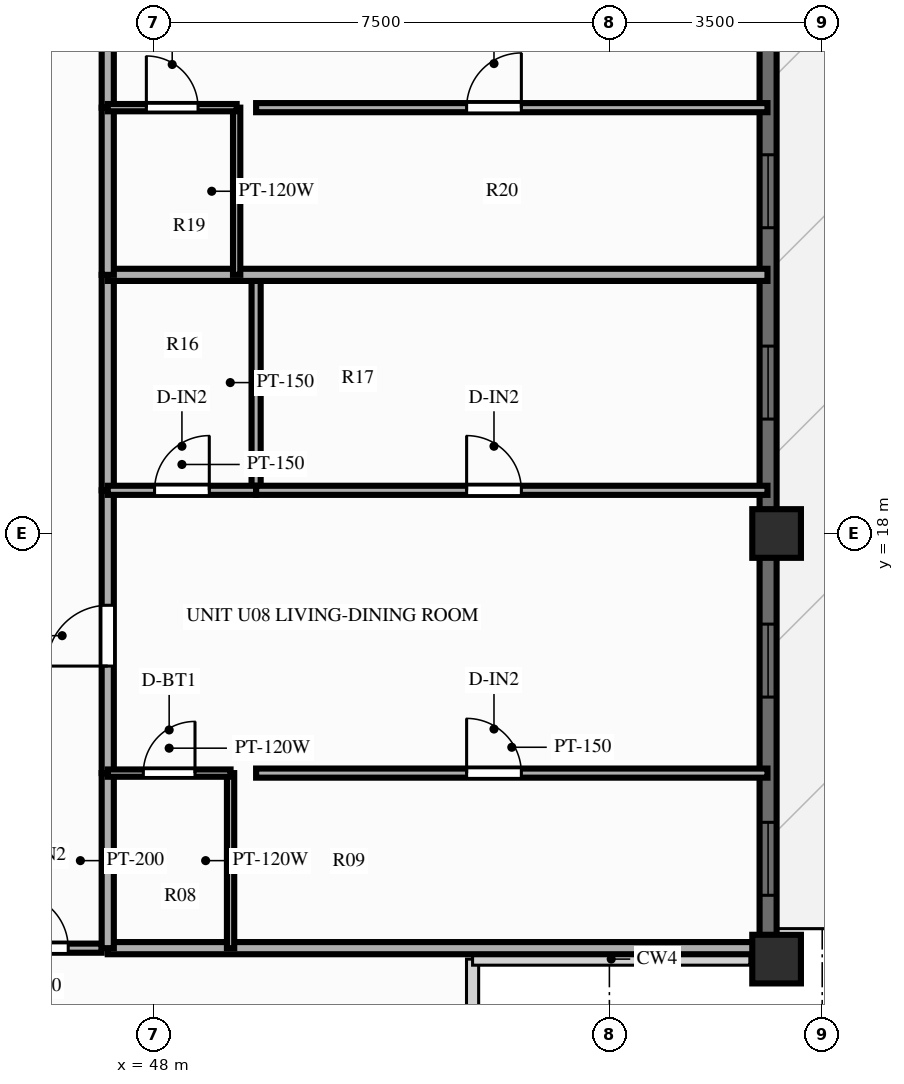
"""IFC4 building model, lengths in metres.
Left out: names, types, materials, properties, quantities, classifications, styles, units other than length and angle.
Written with IfcOpenShell. Run it as: python <this file> out.ifc"""

import sys

from ifc_helpers import new_model, si_unit, direction, frame, frame_2d, origin, origin_2d, place, context, subcontext, project, spatial, rectangle, extrude, source, transform, mapped, element, fill, save


model = new_model("IFC4")
c1 = context("Model", 3, precision=1e-05, world=origin(), true_north=direction((0.0, 1.0)))
c2 = subcontext(c1, "Body", "Model", "MODEL_VIEW")
j1 = project(units=[si_unit("LENGTHUNIT", "METRE"), si_unit("PLANEANGLEUNIT", "RADIAN")], contexts=[c1])
p1 = place(None, origin())
s1 = spatial("IfcSite", under=j1, at=p1, CompositionType="ELEMENT")
p2 = place(p1, origin())
s2 = spatial("IfcBuilding", under=s1, at=p2, CompositionType="ELEMENT")
p3 = place(p2, frame((0.0, 0.0, 176.8)))
s3 = spatial("IfcBuildingStorey", under=s2, at=p3, CompositionType="ELEMENT", Elevation=176.8)
m1 = source(origin(), c2, "Body", "SweptSolid", [
    extrude(rectangle(XDim=0.8, YDim=0.8, at=origin_2d()), origin(), (0.0, 0.0, 1.0), 3.0),
])
for number, where, z_axis, x_axis in (
    (1, (58.25, 11.0, 0.0), (0.0, 0.0, 1.0), (1.0, 0.0, 0.0)),
    (2, (58.25, 18.0, 0.0), (0.0, 0.0, 1.0), (1.0, 0.0, 0.0)),
):
    element("IfcColumn", number, at=place(p3, frame(where, z_axis=z_axis, x_axis=x_axis)), inside=s3, PredefinedType="COLUMN", context=c2, shape_type="MappedRepresentation", body=[
        mapped(m1, transform((0.0, 0.0, 0.0), scale=1.0)),
    ])
p4 = place(p3, frame((58.11, 11.0, 0.0), z_axis=(0.0, 0.0, 1.0), x_axis=(0.0, 1.0, 0.0)))
e3 = element("IfcWall", 3, at=p4, inside=s3, PredefinedType="SOLIDWALL", context=c2, shape_type="SweptSolid", body=[
    extrude(rectangle(XDim=32.0, YDim=0.28, at=frame_2d((16.0, 0.0))), origin(), (0.0, 0.0, 1.0), 2.28),
])
p5 = place(p4, frame((1.05, 0.0, 0.25)))
e4 = element("IfcOpeningElement", 4, at=p5, cuts=e3, PredefinedType="OPENING", context=c2, shape_type="SweptSolid", body=[
    extrude(rectangle(XDim=1.2, YDim=1.5, at=frame_2d((0.6, 0.75))), frame((0.0, 0.152, 0.0), z_axis=(0.0, -1.0, 0.0), x_axis=(1.0, 0.0, 0.0)), (0.0, 0.0, 1.0), 0.304),
])
p6 = place(p4, frame((4.31, 0.0, 0.25)))
e5 = element("IfcOpeningElement", 5, at=p6, cuts=e3, PredefinedType="OPENING", context=c2, shape_type="SweptSolid", body=[
    extrude(rectangle(XDim=1.2, YDim=1.5, at=frame_2d((0.6, 0.75))), frame((0.0, 0.152, 0.0), z_axis=(0.0, -1.0, 0.0), x_axis=(1.0, 0.0, 0.0)), (0.0, 0.0, 1.0), 0.304),
])
p7 = place(p4, frame((8.882, 0.0, 0.25)))
e6 = element("IfcOpeningElement", 6, at=p7, cuts=e3, PredefinedType="OPENING", context=c2, shape_type="SweptSolid", body=[
    extrude(rectangle(XDim=1.2, YDim=1.5, at=frame_2d((0.6, 0.75))), frame((0.0, 0.152, 0.0), z_axis=(0.0, -1.0, 0.0), x_axis=(1.0, 0.0, 0.0)), (0.0, 0.0, 1.0), 0.304),
])
p8 = place(p4, frame((12.029, 0.0, 0.25)))
e7 = element("IfcOpeningElement", 7, at=p8, cuts=e3, PredefinedType="OPENING", context=c2, shape_type="SweptSolid", body=[
    extrude(rectangle(XDim=1.2, YDim=1.5, at=frame_2d((0.6, 0.75))), frame((0.0, 0.152, 0.0), z_axis=(0.0, -1.0, 0.0), x_axis=(1.0, 0.0, 0.0)), (0.0, 0.0, 1.0), 0.304),
])
p9 = place(p4, frame((16.718, 0.0, 0.0), z_axis=(0.0, 0.0, 1.0), x_axis=(-1.0, 0.0, 0.0)))
e8 = element("IfcOpeningElement", 8, at=p9, cuts=e3, PredefinedType="OPENING", context=c2, shape_type="SweptSolid", body=[
    extrude(rectangle(XDim=1.6, YDim=2.15, at=frame_2d((0.8, 1.075))), frame((0.0, 0.152, 0.0), z_axis=(0.0, -1.0, 0.0), x_axis=(1.0, 0.0, 0.0)), (0.0, 0.0, 1.0), 0.304),
])
p10 = place(p4, frame((19.163, 0.0, 0.25)))
e9 = element("IfcOpeningElement", 9, at=p10, cuts=e3, PredefinedType="OPENING", context=c2, shape_type="SweptSolid", body=[
    extrude(rectangle(XDim=1.2, YDim=1.5, at=frame_2d((0.6, 0.75))), frame((0.0, 0.152, 0.0), z_axis=(0.0, -1.0, 0.0), x_axis=(1.0, 0.0, 0.0)), (0.0, 0.0, 1.0), 0.304),
])
p11 = place(p4, frame((22.47, 0.0, 0.25)))
e10 = element("IfcOpeningElement", 10, at=p11, cuts=e3, PredefinedType="OPENING", context=c2, shape_type="SweptSolid", body=[
    extrude(rectangle(XDim=1.2, YDim=1.5, at=frame_2d((0.6, 0.75))), frame((0.0, 0.152, 0.0), z_axis=(0.0, -1.0, 0.0), x_axis=(1.0, 0.0, 0.0)), (0.0, 0.0, 1.0), 0.304),
])
p12 = place(p4, frame((26.006, 0.0, 0.25)))
e11 = element("IfcOpeningElement", 11, at=p12, cuts=e3, PredefinedType="OPENING", context=c2, shape_type="SweptSolid", body=[
    extrude(rectangle(XDim=1.2, YDim=1.5, at=frame_2d((0.6, 0.75))), frame((0.0, 0.152, 0.0), z_axis=(0.0, -1.0, 0.0), x_axis=(1.0, 0.0, 0.0)), (0.0, 0.0, 1.0), 0.304),
])
p13 = place(p4, frame((29.266, 0.0, 0.25)))
e12 = element("IfcOpeningElement", 12, at=p13, cuts=e3, PredefinedType="OPENING", context=c2, shape_type="SweptSolid", body=[
    extrude(rectangle(XDim=1.2, YDim=1.5, at=frame_2d((0.6, 0.75))), frame((0.0, 0.152, 0.0), z_axis=(0.0, -1.0, 0.0), x_axis=(1.0, 0.0, 0.0)), (0.0, 0.0, 1.0), 0.304),
])
p14 = place(p3, frame((44.82, 11.18, 0.0), z_axis=(0.0, 0.0, 1.0), x_axis=(1.0, 0.0, 0.0)))
e13 = element("IfcWall", 13, at=p14, inside=s3, PredefinedType="PARTITIONING", context=c2, shape_type="SweptSolid", body=[
    extrude(rectangle(XDim=2.33, YDim=0.15, at=frame_2d((1.165, 0.0))), origin(), (0.0, 0.0, 1.0), 2.79),
])
p15 = place(p14, frame((0.88, 0.0, 0.0)))
e14 = element("IfcOpeningElement", 14, at=p15, cuts=e13, PredefinedType="OPENING", context=c2, shape_type="SweptSolid", body=[
    extrude(rectangle(XDim=0.9, YDim=2.1, at=frame_2d((0.45, 1.05))), frame((0.0, 0.087, 0.0), z_axis=(0.0, -1.0, 0.0), x_axis=(1.0, 0.0, 0.0)), (0.0, 0.0, 1.0), 0.174),
])
p16 = place(p3, frame((47.25, 11.18, 0.0), z_axis=(0.0, 0.0, 1.0), x_axis=(1.0, 0.0, 0.0)))
e15 = element("IfcWall", 15, at=p16, inside=s3, PredefinedType="PARTITIONING", context=c2, shape_type="SweptSolid", body=[
    extrude(rectangle(XDim=10.85, YDim=0.2, at=frame_2d((5.425, 0.0))), origin(), (0.0, 0.0, 1.0), 2.79),
])
p17 = place(p3, frame((47.25, 11.18, 0.0), z_axis=(0.0, 0.0, 1.0), x_axis=(0.0, 1.0, 0.0)))
e16 = element("IfcWall", 16, at=p17, inside=s3, PredefinedType="PARTITIONING", context=c2, shape_type="SweptSolid", body=[
    extrude(rectangle(XDim=2.879, YDim=0.2, at=frame_2d((1.439, 0.0))), origin(), (0.0, 0.0, 1.0), 2.79),
])
p18 = place(p3, frame((47.25, 14.059, 0.0), z_axis=(0.0, 0.0, 1.0), x_axis=(0.0, 1.0, 0.0)))
e17 = element("IfcWall", 17, at=p18, inside=s3, PredefinedType="PARTITIONING", context=c2, shape_type="SweptSolid", body=[
    extrude(rectangle(XDim=4.651, YDim=0.2, at=frame_2d((2.326, 0.0))), origin(), (0.0, 0.0, 1.0), 2.79),
])
p19 = place(p18, frame((1.76, 0.0, 0.0)))
e18 = element("IfcOpeningElement", 18, at=p19, cuts=e17, PredefinedType="OPENING", context=c2, shape_type="SweptSolid", body=[
    extrude(rectangle(XDim=1.0, YDim=2.15, at=frame_2d((0.5, 1.075))), frame((0.0, 0.112, 0.0), z_axis=(0.0, -1.0, 0.0), x_axis=(1.0, 0.0, 0.0)), (0.0, 0.0, 1.0), 0.224),
])
p20 = place(p3, frame((47.25, 18.71, 0.0), z_axis=(0.0, 0.0, 1.0), x_axis=(0.0, 1.0, 0.0)))
e19 = element("IfcWall", 19, at=p20, inside=s3, PredefinedType="PARTITIONING", context=c2, shape_type="SweptSolid", body=[
    extrude(rectangle(XDim=3.544, YDim=0.2, at=frame_2d((1.772, 0.0))), origin(), (0.0, 0.0, 1.0), 2.79),
])
p21 = place(p3, frame((49.27, 11.18, 0.0), z_axis=(0.0, 0.0, 1.0), x_axis=(0.0, 1.0, 0.0)))
e20 = element("IfcWall", 20, at=p21, inside=s3, PredefinedType="PARTITIONING", context=c2, shape_type="SweptSolid", body=[
    extrude(rectangle(XDim=2.879, YDim=0.12, at=frame_2d((1.439, 0.0))), origin(), (0.0, 0.0, 1.0), 2.79),
])
p22 = place(p3, frame((49.69, 18.71, 0.0), z_axis=(0.0, 0.0, 1.0), x_axis=(0.0, 1.0, 0.0)))
e21 = element("IfcWall", 21, at=p22, inside=s3, PredefinedType="PARTITIONING", context=c2, shape_type="SweptSolid", body=[
    extrude(rectangle(XDim=3.544, YDim=0.15, at=frame_2d((1.772, 0.0))), origin(), (0.0, 0.0, 1.0), 2.79),
])
p23 = place(p3, frame((47.25, 14.059, 0.0), z_axis=(0.0, 0.0, 1.0), x_axis=(1.0, 0.0, 0.0)))
e22 = element("IfcWall", 22, at=p23, inside=s3, PredefinedType="PARTITIONING", context=c2, shape_type="SweptSolid", body=[
    extrude(rectangle(XDim=2.02, YDim=0.12, at=frame_2d((1.01, 0.0))), origin(), (0.0, 0.0, 1.0), 2.79),
])
p24 = place(p23, frame((0.585, 0.0, 0.0)))
e23 = element("IfcOpeningElement", 23, at=p24, cuts=e22, PredefinedType="OPENING", context=c2, shape_type="SweptSolid", body=[
    extrude(rectangle(XDim=0.85, YDim=2.05, at=frame_2d((0.425, 1.025))), frame((0.0, 0.072, 0.0), z_axis=(0.0, -1.0, 0.0), x_axis=(1.0, 0.0, 0.0)), (0.0, 0.0, 1.0), 0.144),
])
p25 = place(p3, frame((49.69, 14.059, 0.0), z_axis=(0.0, 0.0, 1.0), x_axis=(1.0, 0.0, 0.0)))
e24 = element("IfcWall", 24, at=p25, inside=s3, PredefinedType="PARTITIONING", context=c2, shape_type="SweptSolid", body=[
    extrude(rectangle(XDim=8.41, YDim=0.15, at=frame_2d((4.205, 0.0))), origin(), (0.0, 0.0, 1.0), 2.79),
])
p26 = place(p25, frame((3.462, 0.0, 0.0)))
e25 = element("IfcOpeningElement", 25, at=p26, cuts=e24, PredefinedType="OPENING", context=c2, shape_type="SweptSolid", body=[
    extrude(rectangle(XDim=0.9, YDim=2.1, at=frame_2d((0.45, 1.05))), frame((0.0, 0.087, 0.0), z_axis=(0.0, -1.0, 0.0), x_axis=(1.0, 0.0, 0.0)), (0.0, 0.0, 1.0), 0.174),
])
p27 = place(p3, frame((47.25, 18.71, 0.0), z_axis=(0.0, 0.0, 1.0), x_axis=(1.0, 0.0, 0.0)))
e26 = element("IfcWall", 26, at=p27, inside=s3, PredefinedType="PARTITIONING", context=c2, shape_type="SweptSolid", body=[
    extrude(rectangle(XDim=2.44, YDim=0.15, at=frame_2d((1.22, 0.0))), origin(), (0.0, 0.0, 1.0), 2.79),
])
p28 = place(p27, frame((0.77, 0.0, 0.0)))
e27 = element("IfcOpeningElement", 27, at=p28, cuts=e26, PredefinedType="OPENING", context=c2, shape_type="SweptSolid", body=[
    extrude(rectangle(XDim=0.9, YDim=2.1, at=frame_2d((0.45, 1.05))), frame((0.0, 0.087, 0.0), z_axis=(0.0, -1.0, 0.0), x_axis=(1.0, 0.0, 0.0)), (0.0, 0.0, 1.0), 0.174),
])
p29 = place(p3, frame((49.69, 18.71, 0.0), z_axis=(0.0, 0.0, 1.0), x_axis=(1.0, 0.0, 0.0)))
e28 = element("IfcWall", 28, at=p29, inside=s3, PredefinedType="PARTITIONING", context=c2, shape_type="SweptSolid", body=[
    extrude(rectangle(XDim=8.41, YDim=0.15, at=frame_2d((4.205, 0.0))), origin(), (0.0, 0.0, 1.0), 2.79),
])
p30 = place(p29, frame((3.462, 0.0, 0.0)))
e29 = element("IfcOpeningElement", 29, at=p30, cuts=e28, PredefinedType="OPENING", context=c2, shape_type="SweptSolid", body=[
    extrude(rectangle(XDim=0.9, YDim=2.1, at=frame_2d((0.45, 1.05))), frame((0.0, 0.087, 0.0), z_axis=(0.0, -1.0, 0.0), x_axis=(1.0, 0.0, 0.0)), (0.0, 0.0, 1.0), 0.174),
])
p31 = place(p3, frame((47.25, 22.254, 0.0), z_axis=(0.0, 0.0, 1.0), x_axis=(1.0, 0.0, 0.0)))
e30 = element("IfcWall", 30, at=p31, inside=s3, PredefinedType="PARTITIONING", context=c2, shape_type="SweptSolid", body=[
    extrude(rectangle(XDim=10.85, YDim=0.2, at=frame_2d((5.425, 0.0))), origin(), (0.0, 0.0, 1.0), 2.39),
])
p32 = place(p3, frame((47.25, 22.254, 0.0), z_axis=(0.0, 0.0, 1.0), x_axis=(0.0, 1.0, 0.0)))
e31 = element("IfcWall", 31, at=p32, inside=s3, PredefinedType="PARTITIONING", context=c2, shape_type="SweptSolid", body=[
    extrude(rectangle(XDim=2.75, YDim=0.2, at=frame_2d((1.375, 0.0))), origin(), (0.0, 0.0, 1.0), 2.79),
])
p33 = place(p3, frame((47.25, 25.004, 0.0), z_axis=(0.0, 0.0, 1.0), x_axis=(0.0, 1.0, 0.0)))
e32 = element("IfcWall", 32, at=p33, inside=s3, PredefinedType="PARTITIONING", context=c2, shape_type="SweptSolid", body=[
    extrude(rectangle(XDim=3.827, YDim=0.2, at=frame_2d((1.914, 0.0))), origin(), (0.0, 0.0, 1.0), 2.79),
])
p34 = place(p33, frame((1.413, 0.0, 0.0)))
e33 = element("IfcOpeningElement", 33, at=p34, cuts=e32, PredefinedType="OPENING", context=c2, shape_type="SweptSolid", body=[
    extrude(rectangle(XDim=1.0, YDim=2.15, at=frame_2d((0.5, 1.075))), frame((0.0, 0.112, 0.0), z_axis=(0.0, -1.0, 0.0), x_axis=(1.0, 0.0, 0.0)), (0.0, 0.0, 1.0), 0.224),
])
p35 = place(p3, frame((49.37, 22.254, 0.0), z_axis=(0.0, 0.0, 1.0), x_axis=(0.0, 1.0, 0.0)))
e34 = element("IfcWall", 34, at=p35, inside=s3, PredefinedType="PARTITIONING", context=c2, shape_type="SweptSolid", body=[
    extrude(rectangle(XDim=2.75, YDim=0.12, at=frame_2d((1.375, 0.0))), origin(), (0.0, 0.0, 1.0), 2.79),
])
p36 = place(p3, frame((47.25, 25.004, 0.0), z_axis=(0.0, 0.0, 1.0), x_axis=(1.0, 0.0, 0.0)))
e35 = element("IfcWall", 35, at=p36, inside=s3, PredefinedType="PARTITIONING", context=c2, shape_type="SweptSolid", body=[
    extrude(rectangle(XDim=2.12, YDim=0.12, at=frame_2d((1.06, 0.0))), origin(), (0.0, 0.0, 1.0), 2.79),
])
p37 = place(p36, frame((0.635, 0.0, 0.0)))
e36 = element("IfcOpeningElement", 36, at=p37, cuts=e35, PredefinedType="OPENING", context=c2, shape_type="SweptSolid", body=[
    extrude(rectangle(XDim=0.85, YDim=2.05, at=frame_2d((0.425, 1.025))), frame((0.0, 0.072, 0.0), z_axis=(0.0, -1.0, 0.0), x_axis=(1.0, 0.0, 0.0)), (0.0, 0.0, 1.0), 0.144),
])
p38 = place(p3, frame((49.69, 25.004, 0.0), z_axis=(0.0, 0.0, 1.0), x_axis=(1.0, 0.0, 0.0)))
e37 = element("IfcWall", 37, at=p38, inside=s3, PredefinedType="PARTITIONING", context=c2, shape_type="SweptSolid", body=[
    extrude(rectangle(XDim=8.41, YDim=0.15, at=frame_2d((4.205, 0.0))), origin(), (0.0, 0.0, 1.0), 2.79),
])
p39 = place(p38, frame((3.462, 0.0, 0.0)))
e38 = element("IfcOpeningElement", 38, at=p39, cuts=e37, PredefinedType="OPENING", context=c2, shape_type="SweptSolid", body=[
    extrude(rectangle(XDim=0.9, YDim=2.1, at=frame_2d((0.45, 1.05))), frame((0.0, 0.087, 0.0), z_axis=(0.0, -1.0, 0.0), x_axis=(1.0, 0.0, 0.0)), (0.0, 0.0, 1.0), 0.174),
])
m2 = source(origin(), c2, "Body", "SweptSolid", [
    extrude(rectangle(XDim=1.2, YDim=1.5, at=frame_2d((0.6, 0.75))), frame((0.0, 0.03, 0.0), z_axis=(0.0, -1.0, 0.0), x_axis=(1.0, 0.0, 0.0)), (0.0, 0.0, 1.0), 0.06),
])
p40 = place(p5, origin())
e39 = element("IfcWindow", 39, at=p40, inside=s3, PartitioningType="SINGLE_PANEL", PredefinedType="WINDOW", context=c2, shape_type="MappedRepresentation", body=[
    mapped(m2, transform((0.0, 0.0, 0.0), scale=1.0)),
])
fill(e4, e39)
p41 = place(p6, origin())
e40 = element("IfcWindow", 40, at=p41, inside=s3, PartitioningType="SINGLE_PANEL", PredefinedType="WINDOW", context=c2, shape_type="MappedRepresentation", body=[
    mapped(m2, transform((0.0, 0.0, 0.0), scale=1.0)),
])
fill(e5, e40)
p42 = place(p7, origin())
e41 = element("IfcWindow", 41, at=p42, inside=s3, PartitioningType="SINGLE_PANEL", PredefinedType="WINDOW", context=c2, shape_type="MappedRepresentation", body=[
    mapped(m2, transform((0.0, 0.0, 0.0), scale=1.0)),
])
fill(e6, e41)
p43 = place(p8, origin())
e42 = element("IfcWindow", 42, at=p43, inside=s3, PartitioningType="SINGLE_PANEL", PredefinedType="WINDOW", context=c2, shape_type="MappedRepresentation", body=[
    mapped(m2, transform((0.0, 0.0, 0.0), scale=1.0)),
])
fill(e7, e42)
m3 = source(origin(), c2, "Body", "SweptSolid", [
    extrude(rectangle(XDim=0.9, YDim=2.1, at=frame_2d((0.45, 1.05))), frame((0.0, 0.025, 0.0), z_axis=(0.0, -1.0, 0.0), x_axis=(1.0, 0.0, 0.0)), (0.0, 0.0, 1.0), 0.05),
])
p44 = place(p15, origin())
e43 = element("IfcDoor", 43, at=p44, inside=s3, OperationType="SINGLE_SWING_LEFT", PredefinedType="DOOR", context=c2, shape_type="MappedRepresentation", body=[
    mapped(m3, transform((0.0, 0.0, 0.0), scale=1.0)),
])
fill(e14, e43)
m4 = source(origin(), c2, "Body", "SweptSolid", [
    extrude(rectangle(XDim=1.0, YDim=2.15, at=frame_2d((0.5, 1.075))), frame((0.0, 0.025, 0.0), z_axis=(0.0, -1.0, 0.0), x_axis=(1.0, 0.0, 0.0)), (0.0, 0.0, 1.0), 0.05),
])
p45 = place(p19, origin())
e44 = element("IfcDoor", 44, at=p45, inside=s3, OperationType="SINGLE_SWING_LEFT", PredefinedType="DOOR", context=c2, shape_type="MappedRepresentation", body=[
    mapped(m4, transform((0.0, 0.0, 0.0), scale=1.0)),
])
fill(e18, e44)
m5 = source(origin(), c2, "Body", "SweptSolid", [
    extrude(rectangle(XDim=0.85, YDim=2.05, at=frame_2d((0.425, 1.025))), frame((0.0, 0.025, 0.0), z_axis=(0.0, -1.0, 0.0), x_axis=(1.0, 0.0, 0.0)), (0.0, 0.0, 1.0), 0.05),
])
p46 = place(p24, origin())
e45 = element("IfcDoor", 45, at=p46, inside=s3, OperationType="SINGLE_SWING_RIGHT", PredefinedType="DOOR", context=c2, shape_type="MappedRepresentation", body=[
    mapped(m5, transform((0.0, 0.0, 0.0), scale=1.0)),
])
fill(e23, e45)
p47 = place(p26, origin())
e46 = element("IfcDoor", 46, at=p47, inside=s3, OperationType="SINGLE_SWING_LEFT", PredefinedType="DOOR", context=c2, shape_type="MappedRepresentation", body=[
    mapped(m3, transform((0.0, 0.0, 0.0), scale=1.0)),
])
fill(e25, e46)
p48 = place(p28, origin())
e47 = element("IfcDoor", 47, at=p48, inside=s3, OperationType="SINGLE_SWING_RIGHT", PredefinedType="DOOR", context=c2, shape_type="MappedRepresentation", body=[
    mapped(m3, transform((0.0, 0.0, 0.0), scale=1.0)),
])
fill(e27, e47)
p49 = place(p30, origin())
e48 = element("IfcDoor", 48, at=p49, inside=s3, OperationType="SINGLE_SWING_LEFT", PredefinedType="DOOR", context=c2, shape_type="MappedRepresentation", body=[
    mapped(m3, transform((0.0, 0.0, 0.0), scale=1.0)),
])
fill(e29, e48)
p50 = place(p37, origin())
e49 = element("IfcDoor", 49, at=p50, inside=s3, OperationType="SINGLE_SWING_LEFT", PredefinedType="DOOR", context=c2, shape_type="MappedRepresentation", body=[
    mapped(m5, transform((0.0, 0.0, 0.0), scale=1.0)),
])
fill(e36, e49)
p51 = place(p39, origin())
e50 = element("IfcDoor", 50, at=p51, inside=s3, OperationType="SINGLE_SWING_RIGHT", PredefinedType="DOOR", context=c2, shape_type="MappedRepresentation", body=[
    mapped(m3, transform((0.0, 0.0, 0.0), scale=1.0)),
])
fill(e38, e50)
save(model, sys.argv[1])
